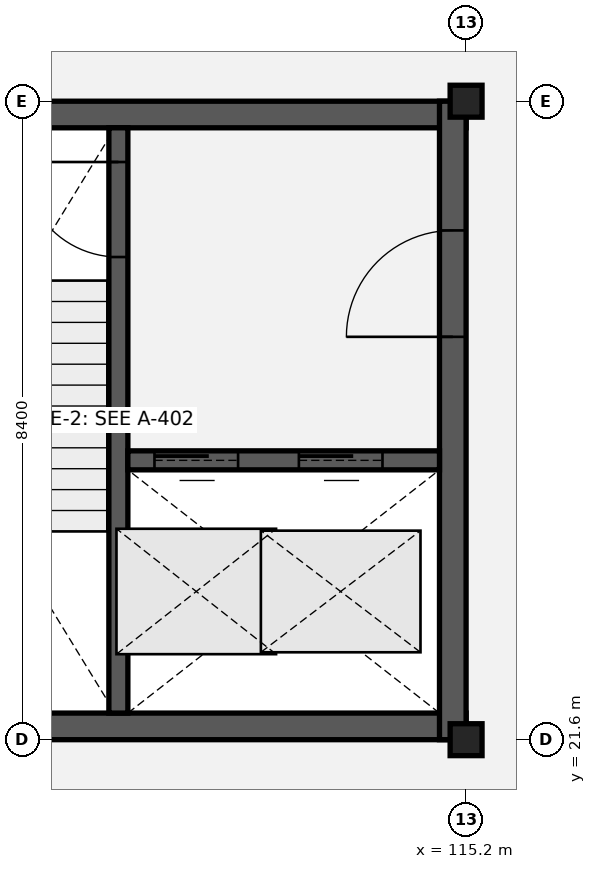
"""IFC4 building model, lengths in metres.
Left out: names, types, materials, properties, quantities, classifications, styles, units other than length and angle.
Written with IfcOpenShell. Run it as: python <this file> out.ifc"""

import sys

from ifc_helpers import new_model, si_unit, direction, frame, frame_2d, origin, origin_2d, place, context, subcontext, project, spatial, rectangle, extrude, element, fill, save


model = new_model("IFC4")
c1 = context("Model", 3, precision=1e-05, world=origin(), true_north=direction((0.0, 1.0)))
c2 = subcontext(c1, "Body", "Model", "MODEL_VIEW")
j1 = project(units=[si_unit("LENGTHUNIT", "METRE"), si_unit("PLANEANGLEUNIT", "RADIAN")], contexts=[c1])
p1 = place(None, origin())
s1 = spatial("IfcSite", under=j1, at=p1, CompositionType="ELEMENT")
p2 = place(p1, origin())
s2 = spatial("IfcBuilding", under=s1, at=p2, CompositionType="ELEMENT")
p3 = place(p2, frame((0.0, 0.0, 10.2)))
s3 = spatial("IfcBuildingStorey", under=s2, at=p3, CompositionType="ELEMENT", Elevation=10.2)
for number, where, z_axis, x_axis in (
    (1, (115.2, 21.6, 0.0), (0.0, 0.0, 1.0), (1.0, 0.0, 0.0)),
    (2, (115.2, 30.0, 0.0), (0.0, 0.0, 1.0), (1.0, 0.0, 0.0)),
):
    element("IfcColumn", number, at=place(p3, frame(where, z_axis=z_axis, x_axis=x_axis)), inside=s3, PredefinedType="COLUMN", context=c2, shape_type="SweptSolid", body=[
        extrude(rectangle(XDim=0.42, YDim=0.42, at=origin_2d()), origin(), (0.0, 0.0, 1.0), 4.2),
    ])
for number, where, z_axis, x_axis in (
    (3, (105.6, 29.825, 0.0), (0.0, 0.0, 1.0), (1.0, 0.0, 0.0)),
    (4, (105.6, 21.775, 0.0), (0.0, 0.0, 1.0), (1.0, 0.0, 0.0)),
):
    element("IfcWall", number, at=place(p3, frame(where, z_axis=z_axis, x_axis=x_axis)), inside=s3, PredefinedType="SHEAR", context=c2, shape_type="SweptSolid", body=[
        extrude(rectangle(XDim=9.6, YDim=0.35, at=frame_2d((4.8, 0.0))), origin(), (0.0, 0.0, 1.0), 3.95),
    ])
p4 = place(p3, frame((115.025, 21.6, 0.0), z_axis=(0.0, 0.0, 1.0), x_axis=(0.0, 1.0, 0.0)))
e5 = element("IfcWall", 5, at=p4, inside=s3, PredefinedType="SHEAR", context=c2, shape_type="SweptSolid", body=[
    extrude(rectangle(XDim=8.4, YDim=0.35, at=frame_2d((4.2, 0.0))), origin(), (0.0, 0.0, 1.0), 3.95),
])
p5 = place(p4, frame((5.3, 0.0, 0.0)))
e6 = element("IfcOpeningElement", 6, at=p5, cuts=e5, PredefinedType="OPENING", context=c2, shape_type="SweptSolid", body=[
    extrude(rectangle(XDim=1.4, YDim=2.15, at=frame_2d((0.7, 1.075))), frame((0.0, 0.185, 0.0), z_axis=(0.0, -1.0, 0.0), x_axis=(1.0, 0.0, 0.0)), (0.0, 0.0, 1.0), 0.37),
])
p6 = place(p3, frame((110.625, 29.65, 0.0), z_axis=(0.0, 0.0, 1.0), x_axis=(0.0, -1.0, 0.0)))
e7 = element("IfcWall", 7, at=p6, inside=s3, PredefinedType="SHEAR", context=c2, shape_type="SweptSolid", body=[
    extrude(rectangle(XDim=7.7, YDim=0.25, at=frame_2d((3.85, 0.0))), origin(), (0.0, 0.0, 1.0), 3.95),
])
p7 = place(p6, frame((0.45, 0.0, 0.0)))
e8 = element("IfcOpeningElement", 8, at=p7, cuts=e7, PredefinedType="OPENING", context=c2, shape_type="SweptSolid", body=[
    extrude(rectangle(XDim=1.25, YDim=2.15, at=frame_2d((0.625, 1.075))), frame((0.0, 0.135, 0.0), z_axis=(0.0, -1.0, 0.0), x_axis=(1.0, 0.0, 0.0)), (0.0, 0.0, 1.0), 0.27),
])
p8 = place(p3, frame((110.75, 25.275, 0.0), z_axis=(0.0, 0.0, 1.0), x_axis=(1.0, 0.0, 0.0)))
e9 = element("IfcWall", 9, at=p8, inside=s3, PredefinedType="SHEAR", context=c2, shape_type="SweptSolid", body=[
    extrude(rectangle(XDim=4.1, YDim=0.25, at=frame_2d((2.05, 0.0))), origin(), (0.0, 0.0, 1.0), 3.95),
])
p9 = place(p8, frame((0.35, 0.0, 0.0)))
e10 = element("IfcOpeningElement", 10, at=p9, cuts=e9, PredefinedType="OPENING", context=c2, shape_type="SweptSolid", body=[
    extrude(rectangle(XDim=1.1, YDim=2.15, at=frame_2d((0.55, 1.075))), frame((0.0, 0.135, 0.0), z_axis=(0.0, -1.0, 0.0), x_axis=(1.0, 0.0, 0.0)), (0.0, 0.0, 1.0), 0.27),
])
p10 = place(p8, frame((2.25, 0.0, 0.0)))
e11 = element("IfcOpeningElement", 11, at=p10, cuts=e9, PredefinedType="OPENING", context=c2, shape_type="SweptSolid", body=[
    extrude(rectangle(XDim=1.1, YDim=2.15, at=frame_2d((0.55, 1.075))), frame((0.0, 0.135, 0.0), z_axis=(0.0, -1.0, 0.0), x_axis=(1.0, 0.0, 0.0)), (0.0, 0.0, 1.0), 0.27),
])
p11 = place(p7, origin())
e12 = element("IfcDoor", 12, at=p11, inside=s3, OperationType="SINGLE_SWING_RIGHT", PredefinedType="DOOR", context=c2, shape_type="SweptSolid", body=[
    extrude(rectangle(XDim=1.25, YDim=2.15, at=frame_2d((0.625, 1.075))), frame((0.0, 0.025, 0.0), z_axis=(0.0, -1.0, 0.0), x_axis=(1.0, 0.0, 0.0)), (0.0, 0.0, 1.0), 0.05),
])
fill(e8, e12)
p12 = place(p9, origin())
e13 = element("IfcDoor", 13, at=p12, inside=s3, OperationType="SLIDING_TO_LEFT", PredefinedType="DOOR", context=c2, shape_type="SweptSolid", body=[
    extrude(rectangle(XDim=1.1, YDim=2.15, at=frame_2d((0.55, 1.075))), frame((0.0, 0.025, 0.0), z_axis=(0.0, -1.0, 0.0), x_axis=(1.0, 0.0, 0.0)), (0.0, 0.0, 1.0), 0.05),
])
fill(e10, e13)
p13 = place(p10, origin())
e14 = element("IfcDoor", 14, at=p13, inside=s3, OperationType="SLIDING_TO_LEFT", PredefinedType="DOOR", context=c2, shape_type="SweptSolid", body=[
    extrude(rectangle(XDim=1.1, YDim=2.15, at=frame_2d((0.55, 1.075))), frame((0.0, 0.025, 0.0), z_axis=(0.0, -1.0, 0.0), x_axis=(1.0, 0.0, 0.0)), (0.0, 0.0, 1.0), 0.05),
])
fill(e11, e14)
p14 = place(p5, origin())
e15 = element("IfcDoor", 15, at=p14, inside=s3, OperationType="SINGLE_SWING_LEFT", PredefinedType="DOOR", context=c2, shape_type="SweptSolid", body=[
    extrude(rectangle(XDim=1.4, YDim=2.15, at=frame_2d((0.7, 1.075))), frame((0.0, 0.025, 0.0), z_axis=(0.0, -1.0, 0.0), x_axis=(1.0, 0.0, 0.0)), (0.0, 0.0, 1.0), 0.05),
])
fill(e6, e15)
save(model, sys.argv[1])
